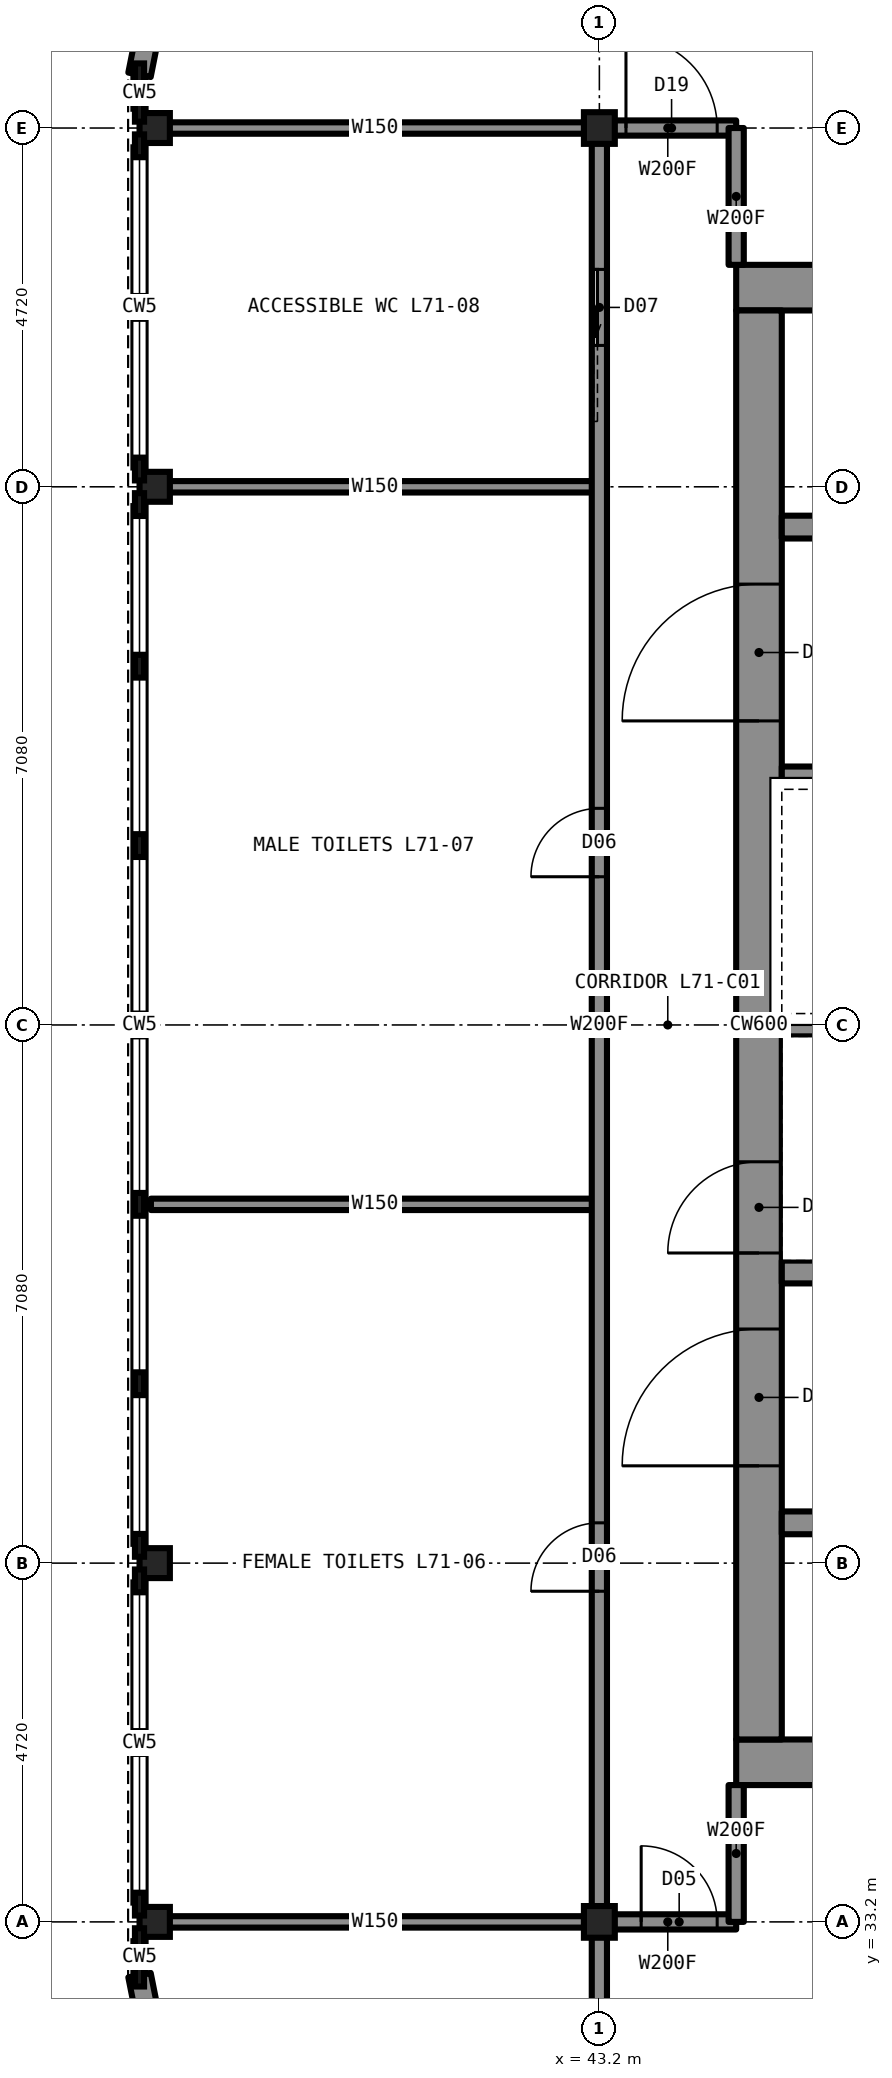
"""IFC4 building model, lengths in metres.
Left out: names, types, materials, properties, quantities, classifications, styles, units other than length and angle.
Written with IfcOpenShell. Run it as: python <this file> out.ifc"""

import sys

from ifc_helpers import new_model, si_unit, direction, frame, frame_2d, origin, origin_2d, place, context, subcontext, project, spatial, rectangle, i_section, extrude, element, fill, save


model = new_model("IFC4")
c1 = context("Model", 3, precision=1e-05, world=origin(), true_north=direction((0.0, 1.0)))
c2 = subcontext(c1, "Body", "Model", "MODEL_VIEW")
j1 = project(units=[si_unit("LENGTHUNIT", "METRE"), si_unit("PLANEANGLEUNIT", "RADIAN")], contexts=[c1])
p1 = place(None, origin())
s1 = spatial("IfcSite", under=j1, at=p1, CompositionType="ELEMENT")
p2 = place(p1, origin())
s2 = spatial("IfcBuilding", under=s1, at=p2, CompositionType="ELEMENT")
p3 = place(p2, frame((0.0, 0.0, 261.7)))
s3 = spatial("IfcBuildingStorey", under=s2, at=p3, CompositionType="ELEMENT", Elevation=261.7)
for number, where, z_axis, x_axis in (
    (1, (37.35, 33.2, 0.0), (0.0, 0.0, 1.0), (1.0, 0.0, 0.0)),
    (2, (37.35, 37.92, 0.0), (0.0, 0.0, 1.0), (1.0, 0.0, 0.0)),
    (3, (37.35, 52.08, 0.0), (0.0, 0.0, 1.0), (1.0, 0.0, 0.0)),
    (4, (37.35, 56.8, 0.0), (0.0, 0.0, 1.0), (1.0, 0.0, 0.0)),
):
    element("IfcColumn", number, at=place(p3, frame(where, z_axis=z_axis, x_axis=x_axis)), inside=s3, PredefinedType="COLUMN", context=c2, shape_type="SweptSolid", body=[
        extrude(i_section(OverallWidth=0.399, OverallDepth=0.394, WebThickness=0.023, FlangeThickness=0.037, at=origin_2d()), origin(), (0.0, 0.0, 1.0), 5.0),
    ])
for number, where, z_axis, x_axis in (
    (5, (43.2, 33.2, 0.0), (0.0, 0.0, 1.0), (1.0, 0.0, 0.0)),
    (6, (43.2, 56.8, 0.0), (0.0, 0.0, 1.0), (1.0, 0.0, 0.0)),
):
    element("IfcColumn", number, at=place(p3, frame(where, z_axis=z_axis, x_axis=x_axis)), inside=s3, PredefinedType="COLUMN", context=c2, shape_type="SweptSolid", body=[
        extrude(i_section(OverallWidth=0.406, OverallDepth=0.417, WebThickness=0.03, FlangeThickness=0.048, at=origin_2d()), origin(), (0.0, 0.0, 1.0), 5.0),
    ])
for number, where, z_axis, x_axis in (
    (7, (45.0, 54.7, 0.0), (0.0, 0.0, 1.0), (1.0, 0.0, 0.0)),
    (8, (45.0, 35.3, 0.0), (0.0, 0.0, 1.0), (1.0, 0.0, 0.0)),
):
    element("IfcWall", number, at=place(p3, frame(where, z_axis=z_axis, x_axis=x_axis)), inside=s3, PredefinedType="SHEAR", context=c2, shape_type="SweptSolid", body=[
        extrude(rectangle(XDim=20.0, YDim=0.6, at=frame_2d((10.0, 0.0))), origin(), (0.0, 0.0, 1.0), 5.0),
    ])
p4 = place(p3, frame((45.3, 35.6, 0.0), z_axis=(0.0, 0.0, 1.0), x_axis=(0.0, 1.0, 0.0)))
e9 = element("IfcWall", 9, at=p4, inside=s3, PredefinedType="SHEAR", context=c2, shape_type="SweptSolid", body=[
    extrude(rectangle(XDim=18.8, YDim=0.6, at=frame_2d((9.4, 0.0))), origin(), (0.0, 0.0, 1.0), 5.0),
])
p5 = place(p4, frame((13.4, 0.0, 0.0)))
e10 = element("IfcOpeningElement", 10, at=p5, cuts=e9, PredefinedType="OPENING", context=c2, shape_type="SweptSolid", body=[
    extrude(rectangle(XDim=1.8, YDim=2.2, at=frame_2d((0.9, 1.1))), frame((0.0, 0.31, 0.0), z_axis=(0.0, -1.0, 0.0), x_axis=(1.0, 0.0, 0.0)), (0.0, 0.0, 1.0), 0.62),
])
p6 = place(p4, frame((3.6, 0.0, 0.0)))
e11 = element("IfcOpeningElement", 11, at=p6, cuts=e9, PredefinedType="OPENING", context=c2, shape_type="SweptSolid", body=[
    extrude(rectangle(XDim=1.8, YDim=2.2, at=frame_2d((0.9, 1.1))), frame((0.0, 0.31, 0.0), z_axis=(0.0, -1.0, 0.0), x_axis=(1.0, 0.0, 0.0)), (0.0, 0.0, 1.0), 0.62),
])
p7 = place(p4, frame((6.4, 0.0, 0.0)))
e12 = element("IfcOpeningElement", 12, at=p7, cuts=e9, PredefinedType="OPENING", context=c2, shape_type="SweptSolid", body=[
    extrude(rectangle(XDim=1.2, YDim=2.2, at=frame_2d((0.6, 1.1))), frame((0.0, 0.31, 0.0), z_axis=(0.0, -1.0, 0.0), x_axis=(1.0, 0.0, 0.0)), (0.0, 0.0, 1.0), 0.62),
])
p8 = place(p3, frame((45.6, 51.55, 0.0), z_axis=(0.0, 0.0, 1.0), x_axis=(1.0, 0.0, 0.0)))
e13 = element("IfcWall", 13, at=p8, inside=s3, PredefinedType="SHEAR", context=c2, shape_type="SweptSolid", body=[
    extrude(rectangle(XDim=18.8, YDim=0.3, at=frame_2d((9.4, 0.0))), origin(), (0.0, 0.0, 1.0), 5.0),
])
p9 = place(p8, frame((4.8, 0.0, 0.0)))
e14 = element("IfcOpeningElement", 14, at=p9, cuts=e13, PredefinedType="OPENING", context=c2, shape_type="SweptSolid", body=[
    extrude(rectangle(XDim=1.0, YDim=2.1, at=frame_2d((0.5, 1.05))), frame((0.0, 0.16, 0.0), z_axis=(0.0, -1.0, 0.0), x_axis=(1.0, 0.0, 0.0)), (0.0, 0.0, 1.0), 0.32),
])
p10 = place(p8, frame((11.6, 0.0, 0.0)))
e15 = element("IfcOpeningElement", 15, at=p10, cuts=e13, PredefinedType="OPENING", context=c2, shape_type="SweptSolid", body=[
    extrude(rectangle(XDim=1.1, YDim=2.2, at=frame_2d((0.55, 1.1))), frame((0.0, 0.16, 0.0), z_axis=(0.0, -1.0, 0.0), x_axis=(1.0, 0.0, 0.0)), (0.0, 0.0, 1.0), 0.32),
])
p11 = place(p8, frame((14.3, 0.0, 0.0)))
e16 = element("IfcOpeningElement", 16, at=p11, cuts=e13, PredefinedType="OPENING", context=c2, shape_type="SweptSolid", body=[
    extrude(rectangle(XDim=1.1, YDim=2.2, at=frame_2d((0.55, 1.1))), frame((0.0, 0.16, 0.0), z_axis=(0.0, -1.0, 0.0), x_axis=(1.0, 0.0, 0.0)), (0.0, 0.0, 1.0), 0.32),
])
p12 = place(p3, frame((45.6, 38.45, 0.0), z_axis=(0.0, 0.0, 1.0), x_axis=(1.0, 0.0, 0.0)))
e17 = element("IfcWall", 17, at=p12, inside=s3, PredefinedType="SHEAR", context=c2, shape_type="SweptSolid", body=[
    extrude(rectangle(XDim=18.8, YDim=0.3, at=frame_2d((9.4, 0.0))), origin(), (0.0, 0.0, 1.0), 5.0),
])
p13 = place(p12, frame((11.5, 0.0, 0.0)))
e18 = element("IfcOpeningElement", 18, at=p13, cuts=e17, PredefinedType="OPENING", context=c2, shape_type="SweptSolid", body=[
    extrude(rectangle(XDim=1.1, YDim=2.2, at=frame_2d((0.55, 1.1))), frame((0.0, 0.16, 0.0), z_axis=(0.0, -1.0, 0.0), x_axis=(1.0, 0.0, 0.0)), (0.0, 0.0, 1.0), 0.32),
])
p14 = place(p12, frame((14.2, 0.0, 0.0)))
e19 = element("IfcOpeningElement", 19, at=p14, cuts=e17, PredefinedType="OPENING", context=c2, shape_type="SweptSolid", body=[
    extrude(rectangle(XDim=1.1, YDim=2.2, at=frame_2d((0.55, 1.1))), frame((0.0, 0.16, 0.0), z_axis=(0.0, -1.0, 0.0), x_axis=(1.0, 0.0, 0.0)), (0.0, 0.0, 1.0), 0.32),
])
p15 = place(p12, frame((16.9, 0.0, 0.0)))
e20 = element("IfcOpeningElement", 20, at=p15, cuts=e17, PredefinedType="OPENING", context=c2, shape_type="SweptSolid", body=[
    extrude(rectangle(XDim=1.1, YDim=2.2, at=frame_2d((0.55, 1.1))), frame((0.0, 0.16, 0.0), z_axis=(0.0, -1.0, 0.0), x_axis=(1.0, 0.0, 0.0)), (0.0, 0.0, 1.0), 0.32),
])
for number, where, z_axis, x_axis in (
    (21, (45.6, 48.25, 0.0), (0.0, 0.0, 1.0), (1.0, 0.0, 0.0)),
    (22, (45.6, 41.75, 0.0), (0.0, 0.0, 1.0), (1.0, 0.0, 0.0)),
):
    element("IfcWall", number, at=place(p3, frame(where, z_axis=z_axis, x_axis=x_axis)), inside=s3, PredefinedType="SHEAR", context=c2, shape_type="SweptSolid", body=[
        extrude(rectangle(XDim=7.1, YDim=0.3, at=frame_2d((3.55, 0.0))), origin(), (0.0, 0.0, 1.0), 5.0),
    ])
p16 = place(p3, frame((45.6, 45.0, 0.0), z_axis=(0.0, 0.0, 1.0), x_axis=(1.0, 0.0, 0.0)))
e23 = element("IfcWall", 23, at=p16, inside=s3, PredefinedType="SHEAR", context=c2, shape_type="SweptSolid", body=[
    extrude(rectangle(XDim=6.8, YDim=0.3, at=frame_2d((3.4, 0.0))), origin(), (0.0, 0.0, 1.0), 5.0),
])
p17 = place(p3, frame((43.2, 33.2, 0.0), z_axis=(0.0, 0.0, 1.0), x_axis=(1.0, 0.0, 0.0)))
e24 = element("IfcWall", 24, at=p17, inside=s3, PredefinedType="PARTITIONING", context=c2, shape_type="SweptSolid", body=[
    extrude(rectangle(XDim=1.8, YDim=0.2, at=frame_2d((0.9, 0.0))), origin(), (0.0, 0.0, 1.0), 4.83),
])
p18 = place(p17, frame((0.55, 0.0, 0.0)))
e25 = element("IfcOpeningElement", 25, at=p18, cuts=e24, PredefinedType="OPENING", context=c2, shape_type="SweptSolid", body=[
    extrude(rectangle(XDim=1.0, YDim=2.1, at=frame_2d((0.5, 1.05))), frame((0.0, 0.11, 0.0), z_axis=(0.0, -1.0, 0.0), x_axis=(1.0, 0.0, 0.0)), (0.0, 0.0, 1.0), 0.22),
])
p19 = place(p3, frame((37.3, 33.2, 0.0), z_axis=(0.0, 0.0, 1.0), x_axis=(1.0, 0.0, 0.0)))
e26 = element("IfcWall", 26, at=p19, inside=s3, PredefinedType="PARTITIONING", context=c2, shape_type="SweptSolid", body=[
    extrude(rectangle(XDim=5.9, YDim=0.15, at=frame_2d((2.95, 0.0))), origin(), (0.0, 0.0, 1.0), 4.068),
])
p20 = place(p3, frame((37.3, 42.64, 0.0), z_axis=(0.0, 0.0, 1.0), x_axis=(1.0, 0.0, 0.0)))
e27 = element("IfcWall", 27, at=p20, inside=s3, PredefinedType="PARTITIONING", context=c2, shape_type="SweptSolid", body=[
    extrude(rectangle(XDim=5.9, YDim=0.15, at=frame_2d((2.95, 0.0))), origin(), (0.0, 0.0, 1.0), 4.147),
])
p21 = place(p3, frame((43.2, 56.8, 0.0), z_axis=(0.0, 0.0, 1.0), x_axis=(1.0, 0.0, 0.0)))
e28 = element("IfcWall", 28, at=p21, inside=s3, PredefinedType="PARTITIONING", context=c2, shape_type="SweptSolid", body=[
    extrude(rectangle(XDim=1.8, YDim=0.2, at=frame_2d((0.9, 0.0))), origin(), (0.0, 0.0, 1.0), 4.83),
])
p22 = place(p21, frame((0.35, 0.0, 0.0)))
e29 = element("IfcOpeningElement", 29, at=p22, cuts=e28, PredefinedType="OPENING", context=c2, shape_type="SweptSolid", body=[
    extrude(rectangle(XDim=1.2, YDim=2.2, at=frame_2d((0.6, 1.1))), frame((0.0, 0.11, 0.0), z_axis=(0.0, -1.0, 0.0), x_axis=(1.0, 0.0, 0.0)), (0.0, 0.0, 1.0), 0.22),
])
for number, where, z_axis, x_axis in (
    (30, (37.3, 56.8, 0.0), (0.0, 0.0, 1.0), (1.0, 0.0, 0.0)),
    (31, (37.3, 52.08, 0.0), (0.0, 0.0, 1.0), (1.0, 0.0, 0.0)),
):
    element("IfcWall", number, at=place(p3, frame(where, z_axis=z_axis, x_axis=x_axis)), inside=s3, PredefinedType="PARTITIONING", context=c2, shape_type="SweptSolid", body=[
        extrude(rectangle(XDim=5.9, YDim=0.15, at=frame_2d((2.95, 0.0))), origin(), (0.0, 0.0, 1.0), 4.068),
    ])
for number, where, z_axis, x_axis in (
    (32, (45.0, 33.2, 0.0), (0.0, 0.0, 1.0), (0.0, 1.0, 0.0)),
    (33, (45.0, 55.0, 0.0), (0.0, 0.0, 1.0), (0.0, 1.0, 0.0)),
):
    element("IfcWall", number, at=place(p3, frame(where, z_axis=z_axis, x_axis=x_axis)), inside=s3, PredefinedType="PARTITIONING", context=c2, shape_type="SweptSolid", body=[
        extrude(rectangle(XDim=1.8, YDim=0.2, at=frame_2d((0.9, 0.0))), origin(), (0.0, 0.0, 1.0), 4.83),
    ])
p23 = place(p3, frame((43.2, 33.2, 0.0), z_axis=(0.0, 0.0, 1.0), x_axis=(0.0, 1.0, 0.0)))
e34 = element("IfcWall", 34, at=p23, inside=s3, PredefinedType="PARTITIONING", context=c2, shape_type="SweptSolid", body=[
    extrude(rectangle(XDim=23.6, YDim=0.2, at=frame_2d((11.8, 0.0))), origin(), (0.0, 0.0, 1.0), 4.83),
])
p24 = place(p23, frame((20.74, 0.0, 0.0)))
e35 = element("IfcOpeningElement", 35, at=p24, cuts=e34, PredefinedType="OPENING", context=c2, shape_type="SweptSolid", body=[
    extrude(rectangle(XDim=1.0, YDim=2.1, at=frame_2d((0.5, 1.05))), frame((0.0, 0.11, 0.0), z_axis=(0.0, -1.0, 0.0), x_axis=(1.0, 0.0, 0.0)), (0.0, 0.0, 1.0), 0.22),
])
p25 = place(p23, frame((4.35, 0.0, 0.0)))
e36 = element("IfcOpeningElement", 36, at=p25, cuts=e34, PredefinedType="OPENING", context=c2, shape_type="SweptSolid", body=[
    extrude(rectangle(XDim=0.9, YDim=2.1, at=frame_2d((0.45, 1.05))), frame((0.0, 0.11, 0.0), z_axis=(0.0, -1.0, 0.0), x_axis=(1.0, 0.0, 0.0)), (0.0, 0.0, 1.0), 0.22),
])
p26 = place(p23, frame((13.75, 0.0, 0.0)))
e37 = element("IfcOpeningElement", 37, at=p26, cuts=e34, PredefinedType="OPENING", context=c2, shape_type="SweptSolid", body=[
    extrude(rectangle(XDim=0.9, YDim=2.1, at=frame_2d((0.45, 1.05))), frame((0.0, 0.11, 0.0), z_axis=(0.0, -1.0, 0.0), x_axis=(1.0, 0.0, 0.0)), (0.0, 0.0, 1.0), 0.22),
])
p27 = place(p3, frame((43.2, 27.3, 0.0), z_axis=(0.0, 0.0, 1.0), x_axis=(0.0, 1.0, 0.0)))
e38 = element("IfcWall", 38, at=p27, inside=s3, PredefinedType="PARTITIONING", context=c2, shape_type="SweptSolid", body=[
    extrude(rectangle(XDim=5.9, YDim=0.2, at=frame_2d((2.95, 0.0))), origin(), (0.0, 0.0, 1.0), 4.068),
])
p28 = place(p27, frame((2.2, 0.0, 0.0)))
e39 = element("IfcOpeningElement", 39, at=p28, cuts=e38, PredefinedType="OPENING", context=c2, shape_type="SweptSolid", body=[
    extrude(rectangle(XDim=1.0, YDim=2.1, at=frame_2d((0.5, 1.05))), frame((0.0, 0.11, 0.0), z_axis=(0.0, -1.0, 0.0), x_axis=(1.0, 0.0, 0.0)), (0.0, 0.0, 1.0), 0.22),
])
for number, where, z_axis, x_axis in (
    (40, (37.557, 59.547, 0.0), (0.0, 0.0, 1.0), (-0.195, -0.981, 0.0)),
    (41, (37.15, 32.5, 0.0), (0.0, 0.0, 1.0), (0.195, -0.981, 0.0)),
):
    element("IfcWall", number, at=place(p3, frame(where, z_axis=z_axis, x_axis=x_axis)), inside=s3, PredefinedType="SOLIDWALL", context=c2, shape_type="SweptSolid", body=[
        extrude(rectangle(XDim=2.087, YDim=0.3, at=frame_2d((1.044, 0.0))), origin(), (0.0, 0.0, 1.0), 4.83),
    ])
p29 = place(p22, origin())
e42 = element("IfcDoor", 42, at=p29, inside=s3, OperationType="SINGLE_SWING_LEFT", PredefinedType="DOOR", context=c2, shape_type="SweptSolid", body=[
    extrude(rectangle(XDim=1.2, YDim=2.2, at=frame_2d((0.6, 1.1))), frame((0.0, 0.025, 0.0), z_axis=(0.0, -1.0, 0.0), x_axis=(1.0, 0.0, 0.0)), (0.0, 0.0, 1.0), 0.05),
])
fill(e29, e42)
p30 = place(p18, origin())
e43 = element("IfcDoor", 43, at=p30, inside=s3, OperationType="SINGLE_SWING_LEFT", PredefinedType="DOOR", context=c2, shape_type="SweptSolid", body=[
    extrude(rectangle(XDim=1.0, YDim=2.1, at=frame_2d((0.5, 1.05))), frame((0.0, 0.025, 0.0), z_axis=(0.0, -1.0, 0.0), x_axis=(1.0, 0.0, 0.0)), (0.0, 0.0, 1.0), 0.05),
])
fill(e25, e43)
p31 = place(p24, origin())
e44 = element("IfcDoor", 44, at=p31, inside=s3, OperationType="SLIDING_TO_LEFT", PredefinedType="DOOR", context=c2, shape_type="SweptSolid", body=[
    extrude(rectangle(XDim=1.0, YDim=2.1, at=frame_2d((0.5, 1.05))), frame((0.0, 0.025, 0.0), z_axis=(0.0, -1.0, 0.0), x_axis=(1.0, 0.0, 0.0)), (0.0, 0.0, 1.0), 0.05),
])
fill(e35, e44)
p32 = place(p25, origin())
e45 = element("IfcDoor", 45, at=p32, inside=s3, OperationType="SINGLE_SWING_LEFT", PredefinedType="DOOR", context=c2, shape_type="SweptSolid", body=[
    extrude(rectangle(XDim=0.9, YDim=2.1, at=frame_2d((0.45, 1.05))), frame((0.0, 0.025, 0.0), z_axis=(0.0, -1.0, 0.0), x_axis=(1.0, 0.0, 0.0)), (0.0, 0.0, 1.0), 0.05),
])
fill(e36, e45)
p33 = place(p26, origin())
e46 = element("IfcDoor", 46, at=p33, inside=s3, OperationType="SINGLE_SWING_LEFT", PredefinedType="DOOR", context=c2, shape_type="SweptSolid", body=[
    extrude(rectangle(XDim=0.9, YDim=2.1, at=frame_2d((0.45, 1.05))), frame((0.0, 0.025, 0.0), z_axis=(0.0, -1.0, 0.0), x_axis=(1.0, 0.0, 0.0)), (0.0, 0.0, 1.0), 0.05),
])
fill(e37, e46)
p34 = place(p5, origin())
e47 = element("IfcDoor", 47, at=p34, inside=s3, OperationType="DOUBLE_DOOR_SINGLE_SWING", PredefinedType="DOOR", context=c2, shape_type="SweptSolid", body=[
    extrude(rectangle(XDim=1.8, YDim=2.2, at=frame_2d((0.9, 1.1))), frame((0.0, 0.025, 0.0), z_axis=(0.0, -1.0, 0.0), x_axis=(1.0, 0.0, 0.0)), (0.0, 0.0, 1.0), 0.05),
])
fill(e10, e47)
p35 = place(p6, origin())
e48 = element("IfcDoor", 48, at=p35, inside=s3, OperationType="DOUBLE_DOOR_SINGLE_SWING", PredefinedType="DOOR", context=c2, shape_type="SweptSolid", body=[
    extrude(rectangle(XDim=1.8, YDim=2.2, at=frame_2d((0.9, 1.1))), frame((0.0, 0.025, 0.0), z_axis=(0.0, -1.0, 0.0), x_axis=(1.0, 0.0, 0.0)), (0.0, 0.0, 1.0), 0.05),
])
fill(e11, e48)
p36 = place(p7, origin())
e49 = element("IfcDoor", 49, at=p36, inside=s3, OperationType="SINGLE_SWING_LEFT", PredefinedType="DOOR", context=c2, shape_type="SweptSolid", body=[
    extrude(rectangle(XDim=1.2, YDim=2.2, at=frame_2d((0.6, 1.1))), frame((0.0, 0.025, 0.0), z_axis=(0.0, -1.0, 0.0), x_axis=(1.0, 0.0, 0.0)), (0.0, 0.0, 1.0), 0.05),
])
fill(e12, e49)
save(model, sys.argv[1])
